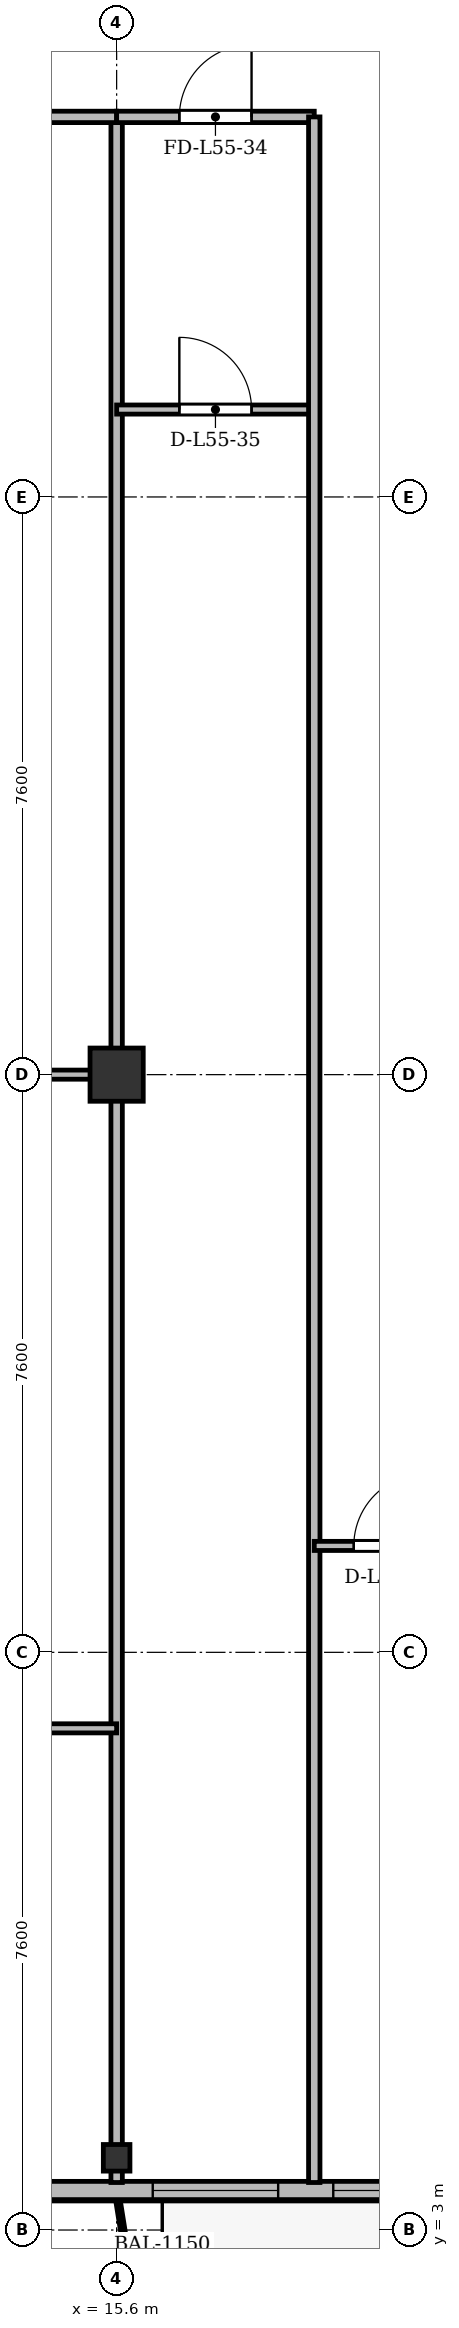
"""IFC4 building model, lengths in metres.
Left out: names, types, materials, properties, quantities, classifications, styles, units other than length and angle.
Written with IfcOpenShell. Run it as: python <this file> out.ifc"""

import sys

from ifc_helpers import new_model, si_unit, direction, frame, frame_2d, origin, origin_2d, place, context, subcontext, project, spatial, rectangle, i_section, extrude, source, transform, mapped, element, fill, save


model = new_model("IFC4")
c1 = context("Model", 3, precision=1e-05, world=origin(), true_north=direction((0.0, 1.0)))
c2 = subcontext(c1, "Body", "Model", "MODEL_VIEW")
j1 = project(units=[si_unit("LENGTHUNIT", "METRE"), si_unit("PLANEANGLEUNIT", "RADIAN")], contexts=[c1])
p1 = place(None, origin())
s1 = spatial("IfcSite", under=j1, at=p1, CompositionType="ELEMENT")
p2 = place(p1, origin())
s2 = spatial("IfcBuilding", under=s1, at=p2, CompositionType="ELEMENT")
p3 = place(p2, frame((0.0, 0.0, 212.1)))
s3 = spatial("IfcBuildingStorey", under=s2, at=p3, CompositionType="ELEMENT", Elevation=212.1)
m1 = source(origin(), c2, "Body", "SweptSolid", [
    extrude(i_section(OverallWidth=0.35, OverallDepth=0.35, WebThickness=0.018, FlangeThickness=0.028, at=origin_2d()), origin(), (0.0, 0.0, 1.0), 3.6),
])
p4 = place(p3, frame((15.6, 3.95, 0.0), z_axis=(0.0, 0.0, 1.0), x_axis=(1.0, 0.0, 0.0)))
e1 = element("IfcColumn", 1, at=p4, inside=s3, PredefinedType="COLUMN", context=c2, shape_type="MappedRepresentation", body=[
    mapped(m1, transform((0.0, 0.0, 0.0), x_axis=(1.0, 0.0, 0.0), y_axis=(0.0, 1.0, 0.0), z_axis=(0.0, 0.0, 1.0), scale=1.0)),
])
m2 = source(origin(), c2, "Body", "SweptSolid", [
    extrude(rectangle(XDim=0.7, YDim=0.7, at=origin_2d()), origin(), (0.0, 0.0, 1.0), 3.6),
])
p5 = place(p3, frame((15.6, 18.2, 0.0), z_axis=(0.0, 0.0, 1.0), x_axis=(1.0, 0.0, 0.0)))
e2 = element("IfcColumn", 2, at=p5, inside=s3, PredefinedType="COLUMN", context=c2, shape_type="MappedRepresentation", body=[
    mapped(m2, transform((0.0, 0.0, 0.0), x_axis=(1.0, 0.0, 0.0), y_axis=(0.0, 1.0, 0.0), z_axis=(0.0, 0.0, 1.0), scale=1.0)),
])
p6 = place(p3, frame((63.4, 3.52, 0.0), z_axis=(0.0, 0.0, 1.0), x_axis=(-1.0, 0.0, 0.0)))
e3 = element("IfcWall", 3, at=p6, inside=s3, PredefinedType="SOLIDWALL", context=c2, shape_type="SweptSolid", body=[
    extrude(rectangle(XDim=52.4, YDim=0.24, at=frame_2d((26.2, 0.0))), origin(), (0.0, 0.0, 1.0), 3.36),
])
p7 = place(p6, frame((1.445, 0.0, 0.9)))
e4 = element("IfcOpeningElement", 4, at=p7, cuts=e3, PredefinedType="OPENING", context=c2, shape_type="SweptSolid", body=[
    extrude(rectangle(XDim=1.8, YDim=1.8, at=frame_2d((0.9, 0.9))), frame((0.0, 0.13, 0.0), z_axis=(0.0, -1.0, 0.0), x_axis=(1.0, 0.0, 0.0)), (0.0, 0.0, 1.0), 0.26),
])
p8 = place(p6, frame((5.15, 0.0, 0.9)))
e5 = element("IfcOpeningElement", 5, at=p8, cuts=e3, PredefinedType="OPENING", context=c2, shape_type="SweptSolid", body=[
    extrude(rectangle(XDim=1.5, YDim=1.75, at=frame_2d((0.75, 0.875))), frame((0.0, 0.13, 0.0), z_axis=(0.0, -1.0, 0.0), x_axis=(1.0, 0.0, 0.0)), (0.0, 0.0, 1.0), 0.26),
])
p9 = place(p6, frame((7.45, 0.0, 0.9)))
e6 = element("IfcOpeningElement", 6, at=p9, cuts=e3, PredefinedType="OPENING", context=c2, shape_type="SweptSolid", body=[
    extrude(rectangle(XDim=1.5, YDim=1.75, at=frame_2d((0.75, 0.875))), frame((0.0, 0.13, 0.0), z_axis=(0.0, -1.0, 0.0), x_axis=(1.0, 0.0, 0.0)), (0.0, 0.0, 1.0), 0.26),
])
p10 = place(p6, frame((9.8, 0.0, 0.9)))
e7 = element("IfcOpeningElement", 7, at=p10, cuts=e3, PredefinedType="OPENING", context=c2, shape_type="SweptSolid", body=[
    extrude(rectangle(XDim=2.0, YDim=1.95, at=frame_2d((1.0, 0.975))), frame((0.0, 0.13, 0.0), z_axis=(0.0, -1.0, 0.0), x_axis=(1.0, 0.0, 0.0)), (0.0, 0.0, 1.0), 0.26),
])
p11 = place(p6, frame((14.217, 0.0, 0.0)))
e8 = element("IfcOpeningElement", 8, at=p11, cuts=e3, PredefinedType="OPENING", context=c2, shape_type="SweptSolid", body=[
    extrude(rectangle(XDim=1.2, YDim=2.2, at=frame_2d((0.6, 1.1))), frame((0.0, 0.13, 0.0), z_axis=(0.0, -1.0, 0.0), x_axis=(1.0, 0.0, 0.0)), (0.0, 0.0, 1.0), 0.26),
])
p12 = place(p6, frame((20.034, 0.0, 0.9)))
e9 = element("IfcOpeningElement", 9, at=p12, cuts=e3, PredefinedType="OPENING", context=c2, shape_type="SweptSolid", body=[
    extrude(rectangle(XDim=1.8, YDim=1.8, at=frame_2d((0.9, 0.9))), frame((0.0, 0.13, 0.0), z_axis=(0.0, -1.0, 0.0), x_axis=(1.0, 0.0, 0.0)), (0.0, 0.0, 1.0), 0.26),
])
p13 = place(p6, frame((22.5, 0.0, 0.9)))
e10 = element("IfcOpeningElement", 10, at=p13, cuts=e3, PredefinedType="OPENING", context=c2, shape_type="SweptSolid", body=[
    extrude(rectangle(XDim=2.2, YDim=1.8, at=frame_2d((1.1, 0.9))), frame((0.0, 0.13, 0.0), z_axis=(0.0, -1.0, 0.0), x_axis=(1.0, 0.0, 0.0)), (0.0, 0.0, 1.0), 0.26),
])
p14 = place(p6, frame((25.517, 0.0, 0.9)))
e11 = element("IfcOpeningElement", 11, at=p14, cuts=e3, PredefinedType="OPENING", context=c2, shape_type="SweptSolid", body=[
    extrude(rectangle(XDim=1.5, YDim=1.75, at=frame_2d((0.75, 0.875))), frame((0.0, 0.13, 0.0), z_axis=(0.0, -1.0, 0.0), x_axis=(1.0, 0.0, 0.0)), (0.0, 0.0, 1.0), 0.26),
])
p15 = place(p6, frame((29.2, 0.0, 0.9)))
e12 = element("IfcOpeningElement", 12, at=p15, cuts=e3, PredefinedType="OPENING", context=c2, shape_type="SweptSolid", body=[
    extrude(rectangle(XDim=2.0, YDim=1.95, at=frame_2d((1.0, 0.975))), frame((0.0, 0.13, 0.0), z_axis=(0.0, -1.0, 0.0), x_axis=(1.0, 0.0, 0.0)), (0.0, 0.0, 1.0), 0.26),
])
p16 = place(p6, frame((33.175, 0.0, 0.9)))
e13 = element("IfcOpeningElement", 13, at=p16, cuts=e3, PredefinedType="OPENING", context=c2, shape_type="SweptSolid", body=[
    extrude(rectangle(XDim=1.65, YDim=1.85, at=frame_2d((0.825, 0.925))), frame((0.0, 0.13, 0.0), z_axis=(0.0, -1.0, 0.0), x_axis=(1.0, 0.0, 0.0)), (0.0, 0.0, 1.0), 0.26),
])
p17 = place(p6, frame((35.5, 0.0, 0.9)))
e14 = element("IfcOpeningElement", 14, at=p17, cuts=e3, PredefinedType="OPENING", context=c2, shape_type="SweptSolid", body=[
    extrude(rectangle(XDim=1.8, YDim=1.8, at=frame_2d((0.9, 0.9))), frame((0.0, 0.13, 0.0), z_axis=(0.0, -1.0, 0.0), x_axis=(1.0, 0.0, 0.0)), (0.0, 0.0, 1.0), 0.26),
])
p18 = place(p6, frame((38.05, 0.0, 0.9)))
e15 = element("IfcOpeningElement", 15, at=p18, cuts=e3, PredefinedType="OPENING", context=c2, shape_type="SweptSolid", body=[
    extrude(rectangle(XDim=1.5, YDim=1.75, at=frame_2d((0.75, 0.875))), frame((0.0, 0.13, 0.0), z_axis=(0.0, -1.0, 0.0), x_axis=(1.0, 0.0, 0.0)), (0.0, 0.0, 1.0), 0.26),
])
p19 = place(p6, frame((41.456, 0.0, 0.0)))
e16 = element("IfcOpeningElement", 16, at=p19, cuts=e3, PredefinedType="OPENING", context=c2, shape_type="SweptSolid", body=[
    extrude(rectangle(XDim=1.2, YDim=2.2, at=frame_2d((0.6, 1.1))), frame((0.0, 0.13, 0.0), z_axis=(0.0, -1.0, 0.0), x_axis=(1.0, 0.0, 0.0)), (0.0, 0.0, 1.0), 0.26),
])
p20 = place(p6, frame((43.45, 0.0, 0.9)))
e17 = element("IfcOpeningElement", 17, at=p20, cuts=e3, PredefinedType="OPENING", context=c2, shape_type="SweptSolid", body=[
    extrude(rectangle(XDim=1.5, YDim=1.75, at=frame_2d((0.75, 0.875))), frame((0.0, 0.13, 0.0), z_axis=(0.0, -1.0, 0.0), x_axis=(1.0, 0.0, 0.0)), (0.0, 0.0, 1.0), 0.26),
])
p21 = place(p6, frame((45.675, 0.0, 0.9)))
e18 = element("IfcOpeningElement", 18, at=p21, cuts=e3, PredefinedType="OPENING", context=c2, shape_type="SweptSolid", body=[
    extrude(rectangle(XDim=1.65, YDim=1.85, at=frame_2d((0.825, 0.925))), frame((0.0, 0.13, 0.0), z_axis=(0.0, -1.0, 0.0), x_axis=(1.0, 0.0, 0.0)), (0.0, 0.0, 1.0), 0.26),
])
p22 = place(p6, frame((49.155, 0.0, 0.9)))
e19 = element("IfcOpeningElement", 19, at=p22, cuts=e3, PredefinedType="OPENING", context=c2, shape_type="SweptSolid", body=[
    extrude(rectangle(XDim=1.8, YDim=1.8, at=frame_2d((0.9, 0.9))), frame((0.0, 0.13, 0.0), z_axis=(0.0, -1.0, 0.0), x_axis=(1.0, 0.0, 0.0)), (0.0, 0.0, 1.0), 0.26),
])
p23 = place(p3, frame((15.6, 3.625, 0.0), z_axis=(0.0, 0.0, 1.0), x_axis=(0.0, 1.0, 0.0)))
e20 = element("IfcWall", 20, at=p23, inside=s3, PredefinedType="PARTITIONING", context=c2, shape_type="SweptSolid", body=[
    extrude(rectangle(XDim=27.175, YDim=0.15, at=frame_2d((13.587, 0.0))), origin(), (0.0, 0.0, 1.0), 2.86),
])
p24 = place(p3, frame((8.24, 18.2, 0.0), z_axis=(0.0, 0.0, 1.0), x_axis=(1.0, 0.0, 0.0)))
e21 = element("IfcWall", 21, at=p24, inside=s3, PredefinedType="PARTITIONING", context=c2, shape_type="SweptSolid", body=[
    extrude(rectangle(XDim=7.36, YDim=0.12, at=frame_2d((3.68, 0.0))), origin(), (0.0, 0.0, 1.0), 2.91),
])
p25 = place(p24, frame((3.114, 0.0, 0.0)))
e22 = element("IfcOpeningElement", 22, at=p25, cuts=e21, PredefinedType="OPENING", context=c2, shape_type="SweptSolid", body=[
    extrude(rectangle(XDim=0.95, YDim=2.15, at=frame_2d((0.475, 1.075))), frame((0.0, 0.07, 0.0), z_axis=(0.0, -1.0, 0.0), x_axis=(1.0, 0.0, 0.0)), (0.0, 0.0, 1.0), 0.14),
])
p26 = place(p3, frame((8.225, 30.8, 0.0), z_axis=(0.0, 0.0, 1.0), x_axis=(1.0, 0.0, 0.0)))
e23 = element("IfcWall", 23, at=p26, inside=s3, PredefinedType="PARTITIONING", context=c2, shape_type="SweptSolid", body=[
    extrude(rectangle(XDim=7.375, YDim=0.15, at=frame_2d((3.688, 0.0))), origin(), (0.0, 0.0, 1.0), 2.86),
])
p27 = place(p26, frame((4.877, 0.0, 0.0)))
e24 = element("IfcOpeningElement", 24, at=p27, cuts=e23, PredefinedType="OPENING", context=c2, shape_type="SweptSolid", body=[
    extrude(rectangle(XDim=0.95, YDim=2.15, at=frame_2d((0.475, 1.075))), frame((0.0, 0.085, 0.0), z_axis=(0.0, -1.0, 0.0), x_axis=(1.0, 0.0, 0.0)), (0.0, 0.0, 1.0), 0.17),
])
p28 = place(p3, frame((8.24, 9.6, 0.0), z_axis=(0.0, 0.0, 1.0), x_axis=(1.0, 0.0, 0.0)))
e25 = element("IfcWall", 25, at=p28, inside=s3, PredefinedType="PARTITIONING", context=c2, shape_type="SweptSolid", body=[
    extrude(rectangle(XDim=7.36, YDim=0.12, at=frame_2d((3.68, 0.0))), origin(), (0.0, 0.0, 1.0), 2.86),
])
p29 = place(p28, frame((3.114, 0.0, 0.0)))
e26 = element("IfcOpeningElement", 26, at=p29, cuts=e25, PredefinedType="OPENING", context=c2, shape_type="SweptSolid", body=[
    extrude(rectangle(XDim=0.95, YDim=2.15, at=frame_2d((0.475, 1.075))), frame((0.0, 0.07, 0.0), z_axis=(0.0, -1.0, 0.0), x_axis=(1.0, 0.0, 0.0)), (0.0, 0.0, 1.0), 0.14),
])
p30 = place(p3, frame((15.6, 30.8, 0.0), z_axis=(0.0, 0.0, 1.0), x_axis=(1.0, 0.0, 0.0)))
e27 = element("IfcWall", 27, at=p30, inside=s3, PredefinedType="PARTITIONING", context=c2, shape_type="SweptSolid", body=[
    extrude(rectangle(XDim=2.6, YDim=0.15, at=frame_2d((1.3, 0.0))), origin(), (0.0, 0.0, 1.0), 2.86),
])
p31 = place(p30, frame((0.825, 0.0, 0.0)))
e28 = element("IfcOpeningElement", 28, at=p31, cuts=e27, PredefinedType="OPENING", context=c2, shape_type="SweptSolid", body=[
    extrude(rectangle(XDim=0.95, YDim=2.15, at=frame_2d((0.475, 1.075))), frame((0.0, 0.085, 0.0), z_axis=(0.0, -1.0, 0.0), x_axis=(1.0, 0.0, 0.0)), (0.0, 0.0, 1.0), 0.17),
])
p32 = place(p3, frame((15.6, 26.95, 0.0), z_axis=(0.0, 0.0, 1.0), x_axis=(1.0, 0.0, 0.0)))
e29 = element("IfcWall", 29, at=p32, inside=s3, PredefinedType="PARTITIONING", context=c2, shape_type="SweptSolid", body=[
    extrude(rectangle(XDim=2.6, YDim=0.12, at=frame_2d((1.3, 0.0))), origin(), (0.0, 0.0, 1.0), 2.86),
])
p33 = place(p32, frame((0.825, 0.0, 0.0)))
e30 = element("IfcOpeningElement", 30, at=p33, cuts=e29, PredefinedType="OPENING", context=c2, shape_type="SweptSolid", body=[
    extrude(rectangle(XDim=0.95, YDim=2.15, at=frame_2d((0.475, 1.075))), frame((0.0, 0.07, 0.0), z_axis=(0.0, -1.0, 0.0), x_axis=(1.0, 0.0, 0.0)), (0.0, 0.0, 1.0), 0.14),
])
p34 = place(p3, frame((18.2, 3.625, 0.0), z_axis=(0.0, 0.0, 1.0), x_axis=(0.0, 1.0, 0.0)))
e31 = element("IfcWall", 31, at=p34, inside=s3, PredefinedType="PARTITIONING", context=c2, shape_type="SweptSolid", body=[
    extrude(rectangle(XDim=27.175, YDim=0.15, at=frame_2d((13.587, 0.0))), origin(), (0.0, 0.0, 1.0), 2.91),
])
p35 = place(p3, frame((18.2, 12.0, 0.0), z_axis=(0.0, 0.0, 1.0), x_axis=(1.0, 0.0, 0.0)))
e32 = element("IfcWall", 32, at=p35, inside=s3, PredefinedType="PARTITIONING", context=c2, shape_type="SweptSolid", body=[
    extrude(rectangle(XDim=2.0, YDim=0.12, at=frame_2d((1.0, 0.0))), origin(), (0.0, 0.0, 1.0), 3.36),
])
p36 = place(p35, frame((0.52, 0.0, 0.0)))
e33 = element("IfcOpeningElement", 33, at=p36, cuts=e32, PredefinedType="OPENING", context=c2, shape_type="SweptSolid", body=[
    extrude(rectangle(XDim=0.95, YDim=2.15, at=frame_2d((0.475, 1.075))), frame((0.0, 0.07, 0.0), z_axis=(0.0, -1.0, 0.0), x_axis=(1.0, 0.0, 0.0)), (0.0, 0.0, 1.0), 0.14),
])
m3 = source(origin(), c2, "Body", "SweptSolid", [
    extrude(rectangle(XDim=1.5, YDim=1.75, at=frame_2d((0.75, 0.875))), frame((0.0, 0.03, 0.0), z_axis=(0.0, -1.0, 0.0), x_axis=(1.0, 0.0, 0.0)), (0.0, 0.0, 1.0), 0.06),
])
p37 = place(p20, origin())
e34 = element("IfcWindow", 34, at=p37, inside=s3, PartitioningType="SINGLE_PANEL", PredefinedType="WINDOW", context=c2, shape_type="MappedRepresentation", body=[
    mapped(m3, transform((0.0, 0.0, 0.0), x_axis=(1.0, 0.0, 0.0), y_axis=(0.0, 1.0, 0.0), z_axis=(0.0, 0.0, 1.0), scale=1.0)),
])
fill(e17, e34)
m4 = source(origin(), c2, "Body", "SweptSolid", [
    extrude(rectangle(XDim=1.65, YDim=1.85, at=frame_2d((0.825, 0.925))), frame((0.0, 0.03, 0.0), z_axis=(0.0, -1.0, 0.0), x_axis=(1.0, 0.0, 0.0)), (0.0, 0.0, 1.0), 0.06),
])
p38 = place(p21, origin())
e35 = element("IfcWindow", 35, at=p38, inside=s3, PartitioningType="SINGLE_PANEL", PredefinedType="WINDOW", context=c2, shape_type="MappedRepresentation", body=[
    mapped(m4, transform((0.0, 0.0, 0.0), x_axis=(1.0, 0.0, 0.0), y_axis=(0.0, 1.0, 0.0), z_axis=(0.0, 0.0, 1.0), scale=1.0)),
])
fill(e18, e35)
m5 = source(origin(), c2, "Body", "SweptSolid", [
    extrude(rectangle(XDim=0.95, YDim=2.15, at=frame_2d((0.475, 1.075))), frame((0.0, 0.025, 0.0), z_axis=(0.0, -1.0, 0.0), x_axis=(1.0, 0.0, 0.0)), (0.0, 0.0, 1.0), 0.05),
])
p39 = place(p31, origin())
e36 = element("IfcDoor", 36, at=p39, inside=s3, OperationType="SINGLE_SWING_RIGHT", PredefinedType="DOOR", context=c2, shape_type="MappedRepresentation", body=[
    mapped(m5, transform((0.0, 0.0, 0.0), x_axis=(1.0, 0.0, 0.0), y_axis=(0.0, 1.0, 0.0), z_axis=(0.0, 0.0, 1.0), scale=1.0)),
])
fill(e28, e36)
p40 = place(p33, origin())
e37 = element("IfcDoor", 37, at=p40, inside=s3, OperationType="SINGLE_SWING_LEFT", PredefinedType="DOOR", context=c2, shape_type="MappedRepresentation", body=[
    mapped(m5, transform((0.0, 0.0, 0.0), x_axis=(1.0, 0.0, 0.0), y_axis=(0.0, 1.0, 0.0), z_axis=(0.0, 0.0, 1.0), scale=1.0)),
])
fill(e30, e37)
p41 = place(p36, origin())
e38 = element("IfcDoor", 38, at=p41, inside=s3, OperationType="SINGLE_SWING_RIGHT", PredefinedType="DOOR", context=c2, shape_type="MappedRepresentation", body=[
    mapped(m5, transform((0.0, 0.0, 0.0), x_axis=(1.0, 0.0, 0.0), y_axis=(0.0, 1.0, 0.0), z_axis=(0.0, 0.0, 1.0), scale=1.0)),
])
fill(e33, e38)
save(model, sys.argv[1])
